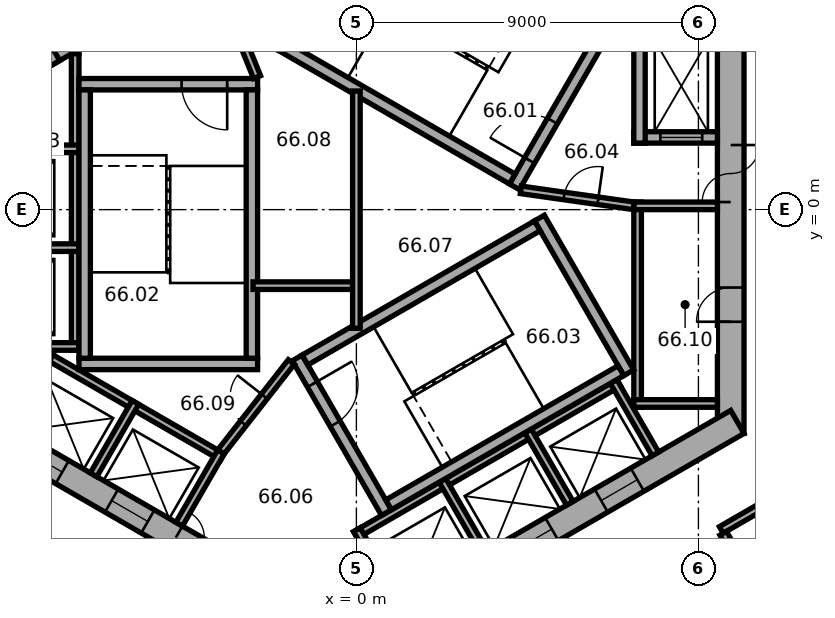
"""IFC4 building model, lengths in metres.
Left out: names, types, materials, properties, quantities, classifications, styles, units other than length and angle.
Written with IfcOpenShell. Run it as: python <this file> out.ifc"""

import sys

from ifc_helpers import new_model, si_unit, direction, frame, frame_2d, origin, place, context, subcontext, project, spatial, rectangle, extrude, element, fill, save


model = new_model("IFC4")
c1 = context("Model", 3, precision=1e-05, world=origin(), true_north=direction((0.0, 1.0)))
c2 = subcontext(c1, "Body", "Model", "MODEL_VIEW")
j1 = project(units=[si_unit("LENGTHUNIT", "METRE"), si_unit("PLANEANGLEUNIT", "RADIAN")], contexts=[c1])
p1 = place(None, origin())
s1 = spatial("IfcSite", under=j1, at=p1, CompositionType="ELEMENT")
p2 = place(p1, origin())
s2 = spatial("IfcBuilding", under=s1, at=p2, CompositionType="ELEMENT")
p3 = place(p2, frame((0.0, 0.0, 267.2)))
s3 = spatial("IfcBuildingStorey", under=s2, at=p3, CompositionType="ELEMENT", Elevation=267.2)
p4 = place(p3, frame((9.85, -5.889, 0.0), z_axis=(0.0, 0.0, 1.0), x_axis=(0.0, 1.0, 0.0)))
e1 = element("IfcWall", 1, at=p4, inside=s3, PredefinedType="SHEAR", context=c2, shape_type="SweptSolid", body=[
    extrude(rectangle(XDim=11.778, YDim=0.7, at=frame_2d((5.889, 0.0))), origin(), (0.0, 0.0, 1.0), 3.7),
])
p5 = place(p4, frame((6.089, 0.0, 0.0)))
e2 = element("IfcOpeningElement", 2, at=p5, cuts=e1, PredefinedType="OPENING", context=c2, shape_type="SweptSolid", body=[
    extrude(rectangle(XDim=1.5, YDim=2.1, at=frame_2d((0.75, 1.05))), frame((0.0, 0.36, 0.0), z_axis=(0.0, -1.0, 0.0), x_axis=(1.0, 0.0, 0.0)), (0.0, 0.0, 1.0), 0.72),
])
p6 = place(p4, frame((2.939, 0.0, 0.0)))
e3 = element("IfcOpeningElement", 3, at=p6, cuts=e1, PredefinedType="OPENING", context=c2, shape_type="SweptSolid", body=[
    extrude(rectangle(XDim=0.9, YDim=2.1, at=frame_2d((0.45, 1.05))), frame((0.0, 0.36, 0.0), z_axis=(0.0, -1.0, 0.0), x_axis=(1.0, 0.0, 0.0)), (0.0, 0.0, 1.0), 0.72),
])
p7 = place(p3, frame((-10.025, -5.586, 0.0), z_axis=(0.0, 0.0, 1.0), x_axis=(0.866026453023, -0.499998182661, 0.0)))
e4 = element("IfcWall", 4, at=p7, inside=s3, PredefinedType="SHEAR", context=c2, shape_type="SweptSolid", body=[
    extrude(rectangle(XDim=11.778, YDim=0.7, at=frame_2d((5.889, 0.0))), origin(), (0.0, 0.0, 1.0), 3.7),
])
p8 = place(p7, frame((6.089, 0.0, 0.0)))
e5 = element("IfcOpeningElement", 5, at=p8, cuts=e4, PredefinedType="OPENING", context=c2, shape_type="SweptSolid", body=[
    extrude(rectangle(XDim=1.5, YDim=2.1, at=frame_2d((0.75, 1.05))), frame((0.0, 0.36, 0.0), z_axis=(0.0, -1.0, 0.0), x_axis=(1.0, 0.0, 0.0)), (0.0, 0.0, 1.0), 0.72),
])
p9 = place(p7, frame((1.539, 0.0, 0.0)))
e6 = element("IfcOpeningElement", 6, at=p9, cuts=e4, PredefinedType="OPENING", context=c2, shape_type="SweptSolid", body=[
    extrude(rectangle(XDim=1.1, YDim=2.1, at=frame_2d((0.55, 1.05))), frame((0.0, 0.36, 0.0), z_axis=(0.0, -1.0, 0.0), x_axis=(1.0, 0.0, 0.0)), (0.0, 0.0, 1.0), 0.72),
])
p10 = place(p7, frame((4.139, 0.0, 0.0)))
e7 = element("IfcOpeningElement", 7, at=p10, cuts=e4, PredefinedType="OPENING", context=c2, shape_type="SweptSolid", body=[
    extrude(rectangle(XDim=1.1, YDim=2.1, at=frame_2d((0.55, 1.05))), frame((0.0, 0.36, 0.0), z_axis=(0.0, -1.0, 0.0), x_axis=(1.0, 0.0, 0.0)), (0.0, 0.0, 1.0), 0.72),
])
p11 = place(p3, frame((-0.175, -11.475, 0.0), z_axis=(0.0, 0.0, 1.0), x_axis=(0.866026453023, 0.499998182661, 0.0)))
e8 = element("IfcWall", 8, at=p11, inside=s3, PredefinedType="SHEAR", context=c2, shape_type="SweptSolid", body=[
    extrude(rectangle(XDim=11.778, YDim=0.7, at=frame_2d((5.889, 0.0))), origin(), (0.0, 0.0, 1.0), 3.7),
])
p12 = place(p11, frame((2.439, 0.0, 0.0)))
e9 = element("IfcOpeningElement", 9, at=p12, cuts=e8, PredefinedType="OPENING", context=c2, shape_type="SweptSolid", body=[
    extrude(rectangle(XDim=1.1, YDim=2.1, at=frame_2d((0.55, 1.05))), frame((0.0, 0.36, 0.0), z_axis=(0.0, -1.0, 0.0), x_axis=(1.0, 0.0, 0.0)), (0.0, 0.0, 1.0), 0.72),
])
p13 = place(p11, frame((5.039, 0.0, 0.0)))
e10 = element("IfcOpeningElement", 10, at=p13, cuts=e8, PredefinedType="OPENING", context=c2, shape_type="SweptSolid", body=[
    extrude(rectangle(XDim=1.1, YDim=2.1, at=frame_2d((0.55, 1.05))), frame((0.0, 0.36, 0.0), z_axis=(0.0, -1.0, 0.0), x_axis=(1.0, 0.0, 0.0)), (0.0, 0.0, 1.0), 0.72),
])
p14 = place(p11, frame((7.639, 0.0, 0.0)))
e11 = element("IfcOpeningElement", 11, at=p14, cuts=e8, PredefinedType="OPENING", context=c2, shape_type="SweptSolid", body=[
    extrude(rectangle(XDim=1.1, YDim=2.1, at=frame_2d((0.55, 1.05))), frame((0.0, 0.36, 0.0), z_axis=(0.0, -1.0, 0.0), x_axis=(1.0, 0.0, 0.0)), (0.0, 0.0, 1.0), 0.72),
])
p15 = place(p3, frame((7.4, -5.2, 0.0), z_axis=(0.0, 0.0, 1.0), x_axis=(0.0, 1.0, 0.0)))
e12 = element("IfcWall", 12, at=p15, inside=s3, PredefinedType="PARTITIONING", context=c2, shape_type="SweptSolid", body=[
    extrude(rectangle(XDim=5.4, YDim=0.2, at=frame_2d((2.7, 0.0))), origin(), (0.0, 0.0, 1.0), 3.42),
])
for number, where, z_axis, x_axis in (
    (13, (7.3, -5.1, 0.0), (0.0, 0.0, 1.0), (1.0, 0.0, 0.0)),
    (14, (7.3, 0.1, 0.0), (0.0, 0.0, 1.0), (1.0, 0.0, 0.0)),
):
    element("IfcWall", number, at=place(p3, frame(where, z_axis=z_axis, x_axis=x_axis)), inside=s3, PredefinedType="PARTITIONING", context=c2, shape_type="SweptSolid", body=[
        extrude(rectangle(XDim=2.2, YDim=0.2, at=frame_2d((1.1, 0.0))), origin(), (0.0, 0.0, 1.0), 3.42),
    ])
p16 = place(p3, frame((-7.4, 4.3, 0.0), z_axis=(0.0, 0.0, 1.0), x_axis=(0.0, -1.0, 0.0)))
e15 = element("IfcWall", 15, at=p16, inside=s3, PredefinedType="PARTITIONING", context=c2, shape_type="SweptSolid", body=[
    extrude(rectangle(XDim=8.0, YDim=0.2, at=frame_2d((4.0, 0.0))), origin(), (0.0, 0.0, 1.0), 3.42),
])
for number, where, z_axis, x_axis in (
    (16, (-7.3, 4.2, 0.0), (0.0, 0.0, 1.0), (-1.0, 0.0, 0.0)),
    (17, (-7.3, 1.6, 0.0), (0.0, 0.0, 1.0), (-1.0, 0.0, 0.0)),
    (18, (-7.3, -1.0, 0.0), (0.0, 0.0, 1.0), (-1.0, 0.0, 0.0)),
    (19, (-7.3, -3.6, 0.0), (0.0, 0.0, 1.0), (-1.0, 0.0, 0.0)),
):
    element("IfcWall", number, at=place(p3, frame(where, z_axis=z_axis, x_axis=x_axis)), inside=s3, PredefinedType="PARTITIONING", context=c2, shape_type="SweptSolid", body=[
        extrude(rectangle(XDim=2.2, YDim=0.2, at=frame_2d((1.1, 0.0))), origin(), (0.0, 0.0, 1.0), 3.42),
    ])
p17 = place(p3, frame((-8.203, -3.809, 0.0), z_axis=(0.0, 0.0, 1.0), x_axis=(0.866028230842, -0.499995103361, 0.0)))
e20 = element("IfcWall", 20, at=p17, inside=s3, PredefinedType="PARTITIONING", context=c2, shape_type="SweptSolid", body=[
    extrude(rectangle(XDim=5.4, YDim=0.2, at=frame_2d((2.7, 0.0))), origin(), (0.0, 0.0, 1.0), 3.42),
])
for number, where, z_axis, x_axis in (
    (21, (-8.067, -3.772, 0.0), (0.0, 0.0, 1.0), (-0.5, -0.866, 0.0)),
    (22, (-5.815, -5.072, 0.0), (0.0, 0.0, 1.0), (-0.5, -0.866, 0.0)),
):
    element("IfcWall", number, at=place(p3, frame(where, z_axis=z_axis, x_axis=x_axis)), inside=s3, PredefinedType="PARTITIONING", context=c2, shape_type="SweptSolid", body=[
        extrude(rectangle(XDim=2.2, YDim=0.2, at=frame_2d((1.1, 0.0))), origin(), (0.0, 0.0, 1.0), 3.42),
    ])
p18 = place(p3, frame((-3.563, -6.372, 0.0), z_axis=(0.0, 0.0, 1.0), x_axis=(-0.499994660107, -0.866028486751, 0.0)))
e23 = element("IfcWall", 23, at=p18, inside=s3, PredefinedType="PARTITIONING", context=c2, shape_type="SweptSolid", body=[
    extrude(rectangle(XDim=2.2, YDim=0.2, at=frame_2d((1.1, 0.0))), origin(), (0.0, 0.0, 1.0), 3.42),
])
p19 = place(p3, frame((-0.024, -8.559, 0.0), z_axis=(0.0, 0.0, 1.0), x_axis=(0.866026010844, 0.49999894854, 0.0)))
e24 = element("IfcWall", 24, at=p19, inside=s3, PredefinedType="PARTITIONING", context=c2, shape_type="SweptSolid", body=[
    extrude(rectangle(XDim=8.0, YDim=0.2, at=frame_2d((4.0, 0.0))), origin(), (0.0, 0.0, 1.0), 3.42),
])
for number, where, z_axis, x_axis in (
    (25, (0.013, -8.422, 0.0), (0.0, 0.0, 1.0), (0.5, -0.866, 0.0)),
    (26, (2.264, -7.122, 0.0), (0.0, 0.0, 1.0), (0.5, -0.866, 0.0)),
    (27, (4.516, -5.822, 0.0), (0.0, 0.0, 1.0), (0.5, -0.866, 0.0)),
    (28, (6.768, -4.522, 0.0), (0.0, 0.0, 1.0), (0.5, -0.866, 0.0)),
):
    element("IfcWall", number, at=place(p3, frame(where, z_axis=z_axis, x_axis=x_axis)), inside=s3, PredefinedType="PARTITIONING", context=c2, shape_type="SweptSolid", body=[
        extrude(rectangle(XDim=2.2, YDim=0.2, at=frame_2d((1.1, 0.0))), origin(), (0.0, 0.0, 1.0), 3.42),
    ])
p20 = place(p3, frame((4.158, 0.602, 0.0), z_axis=(0.0, 0.0, 1.0), x_axis=(0.499977259774, 0.866038532462, 0.0)))
e29 = element("IfcWall", 29, at=p20, inside=s3, PredefinedType="SHEAR", context=c2, shape_type="SweptSolid", body=[
    extrude(rectangle(XDim=4.7, YDim=0.3, at=frame_2d((2.35, 0.0))), origin(), (0.0, 0.0, 1.0), 3.42),
])
p21 = place(p20, frame((0.8, 0.0, 0.0)))
e30 = element("IfcOpeningElement", 30, at=p21, cuts=e29, PredefinedType="OPENING", context=c2, shape_type="SweptSolid", body=[
    extrude(rectangle(XDim=1.2, YDim=2.1, at=frame_2d((0.6, 1.05))), frame((0.0, 0.16, 0.0), z_axis=(0.0, -1.0, 0.0), x_axis=(1.0, 0.0, 0.0)), (0.0, 0.0, 1.0), 0.32),
])
p22 = place(p3, frame((4.103, 0.807, 0.0), z_axis=(0.0, 0.0, 1.0), x_axis=(-0.866027801685, 0.499995846692, 0.0)))
e31 = element("IfcWall", 31, at=p22, inside=s3, PredefinedType="SHEAR", context=c2, shape_type="SweptSolid", body=[
    extrude(rectangle(XDim=7.06, YDim=0.3, at=frame_2d((3.53, 0.0))), origin(), (0.0, 0.0, 1.0), 3.42),
])
p23 = place(p3, frame((-2.6, 3.3, 0.0), z_axis=(0.0, 0.0, 1.0), x_axis=(-1.0, 0.0, 0.0)))
e32 = element("IfcWall", 32, at=p23, inside=s3, PredefinedType="SHEAR", context=c2, shape_type="SweptSolid", body=[
    extrude(rectangle(XDim=4.7, YDim=0.3, at=frame_2d((2.35, 0.0))), origin(), (0.0, 0.0, 1.0), 3.42),
])
p24 = place(p23, frame((0.8, 0.0, 0.0)))
e33 = element("IfcOpeningElement", 33, at=p24, cuts=e32, PredefinedType="OPENING", context=c2, shape_type="SweptSolid", body=[
    extrude(rectangle(XDim=1.2, YDim=2.1, at=frame_2d((0.6, 1.05))), frame((0.0, 0.16, 0.0), z_axis=(0.0, -1.0, 0.0), x_axis=(1.0, 0.0, 0.0)), (0.0, 0.0, 1.0), 0.32),
])
p25 = place(p3, frame((-2.6, -4.06, 0.0), z_axis=(0.0, 0.0, 1.0), x_axis=(-1.0, 0.0, 0.0)))
e34 = element("IfcWall", 34, at=p25, inside=s3, PredefinedType="SHEAR", context=c2, shape_type="SweptSolid", body=[
    extrude(rectangle(XDim=4.7, YDim=0.3, at=frame_2d((2.35, 0.0))), origin(), (0.0, 0.0, 1.0), 3.42),
])
for number, where, z_axis, x_axis in (
    (35, (-2.75, 3.15, 0.0), (0.0, 0.0, 1.0), (0.0, -1.0, 0.0)),
    (36, (-7.15, 3.15, 0.0), (0.0, 0.0, 1.0), (0.0, -1.0, 0.0)),
):
    element("IfcWall", number, at=place(p3, frame(where, z_axis=z_axis, x_axis=x_axis)), inside=s3, PredefinedType="SHEAR", context=c2, shape_type="SweptSolid", body=[
        extrude(rectangle(XDim=7.06, YDim=0.3, at=frame_2d((3.53, 0.0))), origin(), (0.0, 0.0, 1.0), 3.42),
    ])
p26 = place(p3, frame((-1.558, -3.902, 0.0), z_axis=(0.0, 0.0, 1.0), x_axis=(0.499977259774, -0.866038532462, 0.0)))
e37 = element("IfcWall", 37, at=p26, inside=s3, PredefinedType="SHEAR", context=c2, shape_type="SweptSolid", body=[
    extrude(rectangle(XDim=4.7, YDim=0.3, at=frame_2d((2.35, 0.0))), origin(), (0.0, 0.0, 1.0), 3.42),
])
p27 = place(p26, frame((0.8, 0.0, 0.0)))
e38 = element("IfcOpeningElement", 38, at=p27, cuts=e37, PredefinedType="OPENING", context=c2, shape_type="SweptSolid", body=[
    extrude(rectangle(XDim=1.2, YDim=2.1, at=frame_2d((0.6, 1.05))), frame((0.0, 0.16, 0.0), z_axis=(0.0, -1.0, 0.0), x_axis=(1.0, 0.0, 0.0)), (0.0, 0.0, 1.0), 0.32),
])
p28 = place(p3, frame((4.816, -0.222, 0.0), z_axis=(0.0, 0.0, 1.0), x_axis=(0.499977259774, -0.866038532462, 0.0)))
e39 = element("IfcWall", 39, at=p28, inside=s3, PredefinedType="SHEAR", context=c2, shape_type="SweptSolid", body=[
    extrude(rectangle(XDim=4.7, YDim=0.3, at=frame_2d((2.35, 0.0))), origin(), (0.0, 0.0, 1.0), 3.42),
])
for number, where, z_axis, x_axis in (
    (40, (-1.353, -3.957, 0.0), (0.0, 0.0, 1.0), (0.866, 0.5, 0.0)),
    (41, (0.847, -7.767, 0.0), (0.0, 0.0, 1.0), (0.866, 0.5, 0.0)),
):
    element("IfcWall", number, at=place(p3, frame(where, z_axis=z_axis, x_axis=x_axis)), inside=s3, PredefinedType="SHEAR", context=c2, shape_type="SweptSolid", body=[
        extrude(rectangle(XDim=7.06, YDim=0.3, at=frame_2d((3.53, 0.0))), origin(), (0.0, 0.0, 1.0), 3.42),
    ])
p29 = place(p3, frame((7.3, 1.9, 0.0), z_axis=(0.0, 0.0, 1.0), x_axis=(1.0, 0.0, 0.0)))
e42 = element("IfcWall", 42, at=p29, inside=s3, PredefinedType="SHEAR", context=c2, shape_type="SweptSolid", body=[
    extrude(rectangle(XDim=2.2, YDim=0.3, at=frame_2d((1.1, 0.0))), origin(), (0.0, 0.0, 1.0), 3.42),
])
p30 = place(p29, frame((0.7, 0.0, 0.0)))
e43 = element("IfcOpeningElement", 43, at=p30, cuts=e42, PredefinedType="OPENING", context=c2, shape_type="SweptSolid", body=[
    extrude(rectangle(XDim=1.1, YDim=2.1, at=frame_2d((0.55, 1.05))), frame((0.0, 0.16, 0.0), z_axis=(0.0, -1.0, 0.0), x_axis=(1.0, 0.0, 0.0)), (0.0, 0.0, 1.0), 0.32),
])
p31 = place(p3, frame((7.45, 1.75, 0.0), z_axis=(0.0, 0.0, 1.0), x_axis=(0.0, 1.0, 0.0)))
e44 = element("IfcWall", 44, at=p31, inside=s3, PredefinedType="SHEAR", context=c2, shape_type="SweptSolid", body=[
    extrude(rectangle(XDim=3.35, YDim=0.3, at=frame_2d((1.675, 0.0))), origin(), (0.0, 0.0, 1.0), 3.42),
])
p32 = place(p3, frame((4.327, 0.521, 0.0), z_axis=(0.0, 0.0, 1.0), x_axis=(0.990124376366, -0.14019172346, 0.0)))
e45 = element("IfcWall", 45, at=p32, inside=s3, PredefinedType="PARTITIONING", context=c2, shape_type="SweptSolid", body=[
    extrude(rectangle(XDim=3.002, YDim=0.2, at=frame_2d((1.501, 0.0))), origin(), (0.0, 0.0, 1.0), 3.42),
])
p33 = place(p32, frame((1.15, 0.0, 0.0)))
e46 = element("IfcOpeningElement", 46, at=p33, cuts=e45, PredefinedType="OPENING", context=c2, shape_type="SweptSolid", body=[
    extrude(rectangle(XDim=0.9, YDim=2.1, at=frame_2d((0.45, 1.05))), frame((0.0, 0.11, 0.0), z_axis=(0.0, -1.0, 0.0), x_axis=(1.0, 0.0, 0.0)), (0.0, 0.0, 1.0), 0.22),
])
p34 = place(p3, frame((-5.24, 5.577, 0.0), z_axis=(0.0, 0.0, 1.0), x_axis=(-0.866014461049, -0.500018952895, 0.0)))
e47 = element("IfcWall", 47, at=p34, inside=s3, PredefinedType="SHEAR", context=c2, shape_type="SweptSolid", body=[
    extrude(rectangle(XDim=3.35, YDim=0.3, at=frame_2d((1.675, 0.0))), origin(), (0.0, 0.0, 1.0), 3.42),
])
p35 = place(p3, frame((-7.937, 3.847, 0.0), z_axis=(0.0, 0.0, 1.0), x_axis=(-0.50002983664, 0.866008176907, 0.0)))
e48 = element("IfcWall", 48, at=p35, inside=s3, PredefinedType="SHEAR", context=c2, shape_type="SweptSolid", body=[
    extrude(rectangle(XDim=2.2, YDim=0.3, at=frame_2d((1.1, 0.0))), origin(), (0.0, 0.0, 1.0), 3.42),
])
p36 = place(p3, frame((-2.615, 3.487, 0.0), z_axis=(0.0, 0.0, 1.0), x_axis=(-0.373576831041, 0.92759924068, 0.0)))
e49 = element("IfcWall", 49, at=p36, inside=s3, PredefinedType="PARTITIONING", context=c2, shape_type="SweptSolid", body=[
    extrude(rectangle(XDim=3.002, YDim=0.2, at=frame_2d((1.501, 0.0))), origin(), (0.0, 0.0, 1.0), 3.42),
])
p37 = place(p36, frame((1.15, 0.0, 0.0)))
e50 = element("IfcOpeningElement", 50, at=p37, cuts=e49, PredefinedType="OPENING", context=c2, shape_type="SweptSolid", body=[
    extrude(rectangle(XDim=0.9, YDim=2.1, at=frame_2d((0.45, 1.05))), frame((0.0, 0.11, 0.0), z_axis=(0.0, -1.0, 0.0), x_axis=(1.0, 0.0, 0.0)), (0.0, 0.0, 1.0), 0.22),
])
p38 = place(p3, frame((-1.712, -4.008, 0.0), z_axis=(0.0, 0.0, 1.0), x_axis=(-0.616549420702, -0.787316208287, 0.0)))
e51 = element("IfcWall", 51, at=p38, inside=s3, PredefinedType="PARTITIONING", context=c2, shape_type="SweptSolid", body=[
    extrude(rectangle(XDim=3.002, YDim=0.2, at=frame_2d((1.501, 0.0))), origin(), (0.0, 0.0, 1.0), 3.42),
])
p39 = place(p38, frame((1.15, 0.0, 0.0)))
e52 = element("IfcOpeningElement", 52, at=p39, cuts=e51, PredefinedType="OPENING", context=c2, shape_type="SweptSolid", body=[
    extrude(rectangle(XDim=0.9, YDim=2.1, at=frame_2d((0.45, 1.05))), frame((0.0, 0.11, 0.0), z_axis=(0.0, -1.0, 0.0), x_axis=(1.0, 0.0, 0.0)), (0.0, 0.0, 1.0), 0.22),
])
p40 = place(p3, frame((-2.72, -2.0, 0.0), z_axis=(0.0, 0.0, 1.0), x_axis=(1.0, 0.0, 0.0)))
e53 = element("IfcWall", 53, at=p40, inside=s3, PredefinedType="PARTITIONING", context=c2, shape_type="SweptSolid", body=[
    extrude(rectangle(XDim=2.62, YDim=0.2, at=frame_2d((1.31, 0.0))), origin(), (0.0, 0.0, 1.0), 3.42),
])
p41 = place(p3, frame((0.0, -3.122, 0.0), z_axis=(0.0, 0.0, 1.0), x_axis=(0.0, 1.0, 0.0)))
e54 = element("IfcWall", 54, at=p41, inside=s3, PredefinedType="PARTITIONING", context=c2, shape_type="SweptSolid", body=[
    extrude(rectangle(XDim=6.245, YDim=0.2, at=frame_2d((3.122, 0.0))), origin(), (0.0, 0.0, 1.0), 3.42),
])
p42 = place(p3, frame((-11.501, -8.719, 0.0), z_axis=(0.0, 0.0, 1.0), x_axis=(0.866024434742, -0.500001678427, 0.0)))
e55 = element("IfcWall", 55, at=p42, inside=s3, PredefinedType="PARTITIONING", context=c2, shape_type="SweptSolid", body=[
    extrude(rectangle(XDim=4.718, YDim=0.2, at=frame_2d((2.359, 0.0))), origin(), (0.0, 0.0, 1.0), 3.42),
])
p43 = place(p3, frame((9.602, -8.428, 0.0), z_axis=(0.0, 0.0, 1.0), x_axis=(0.865999114786, 0.500045531117, 0.0)))
e56 = element("IfcWall", 56, at=p43, inside=s3, PredefinedType="PARTITIONING", context=c2, shape_type="SweptSolid", body=[
    extrude(rectangle(XDim=1.788, YDim=0.2, at=frame_2d((0.894, 0.0))), origin(), (0.0, 0.0, 1.0), 3.42),
])
p44 = place(p3, frame((10.152, -9.382, 0.0), z_axis=(0.0, 0.0, 1.0), x_axis=(-0.499968756647, 0.866043441391, 0.0)))
e57 = element("IfcWall", 57, at=p44, inside=s3, PredefinedType="PARTITIONING", context=c2, shape_type="SweptSolid", body=[
    extrude(rectangle(XDim=1.001, YDim=0.2, at=frame_2d((0.5, 0.0))), origin(), (0.0, 0.0, 1.0), 3.42),
])
p45 = place(p5, origin())
e58 = element("IfcDoor", 58, at=p45, inside=s3, OperationType="DOUBLE_DOOR_SINGLE_SWING", PredefinedType="DOOR", context=c2, shape_type="SweptSolid", body=[
    extrude(rectangle(XDim=1.5, YDim=2.1, at=frame_2d((0.75, 1.05))), frame((0.0, 0.025, 0.0), z_axis=(0.0, -1.0, 0.0), x_axis=(1.0, 0.0, 0.0)), (0.0, 0.0, 1.0), 0.05),
])
fill(e2, e58)
p46 = place(p8, origin())
e59 = element("IfcDoor", 59, at=p46, inside=s3, OperationType="DOUBLE_DOOR_SINGLE_SWING", PredefinedType="DOOR", context=c2, shape_type="SweptSolid", body=[
    extrude(rectangle(XDim=1.5, YDim=2.1, at=frame_2d((0.75, 1.05))), frame((0.0, 0.025, 0.0), z_axis=(0.0, -1.0, 0.0), x_axis=(1.0, 0.0, 0.0)), (0.0, 0.0, 1.0), 0.05),
])
fill(e5, e59)
p47 = place(p21, origin())
e60 = element("IfcDoor", 60, at=p47, inside=s3, OperationType="SINGLE_SWING_RIGHT", PredefinedType="DOOR", context=c2, shape_type="SweptSolid", body=[
    extrude(rectangle(XDim=1.2, YDim=2.1, at=frame_2d((0.6, 1.05))), frame((0.0, 0.025, 0.0), z_axis=(0.0, -1.0, 0.0), x_axis=(1.0, 0.0, 0.0)), (0.0, 0.0, 1.0), 0.05),
])
fill(e30, e60)
p48 = place(p24, origin())
e61 = element("IfcDoor", 61, at=p48, inside=s3, OperationType="SINGLE_SWING_RIGHT", PredefinedType="DOOR", context=c2, shape_type="SweptSolid", body=[
    extrude(rectangle(XDim=1.2, YDim=2.1, at=frame_2d((0.6, 1.05))), frame((0.0, 0.025, 0.0), z_axis=(0.0, -1.0, 0.0), x_axis=(1.0, 0.0, 0.0)), (0.0, 0.0, 1.0), 0.05),
])
fill(e33, e61)
p49 = place(p27, origin())
e62 = element("IfcDoor", 62, at=p49, inside=s3, OperationType="SINGLE_SWING_RIGHT", PredefinedType="DOOR", context=c2, shape_type="SweptSolid", body=[
    extrude(rectangle(XDim=1.2, YDim=2.1, at=frame_2d((0.6, 1.05))), frame((0.0, 0.025, 0.0), z_axis=(0.0, -1.0, 0.0), x_axis=(1.0, 0.0, 0.0)), (0.0, 0.0, 1.0), 0.05),
])
fill(e38, e62)
p50 = place(p33, origin())
e63 = element("IfcDoor", 63, at=p50, inside=s3, OperationType="SINGLE_SWING_LEFT", PredefinedType="DOOR", context=c2, shape_type="SweptSolid", body=[
    extrude(rectangle(XDim=0.9, YDim=2.1, at=frame_2d((0.45, 1.05))), frame((0.0, 0.025, 0.0), z_axis=(0.0, -1.0, 0.0), x_axis=(1.0, 0.0, 0.0)), (0.0, 0.0, 1.0), 0.05),
])
fill(e46, e63)
p51 = place(p39, origin())
e64 = element("IfcDoor", 64, at=p51, inside=s3, OperationType="SINGLE_SWING_LEFT", PredefinedType="DOOR", context=c2, shape_type="SweptSolid", body=[
    extrude(rectangle(XDim=0.9, YDim=2.1, at=frame_2d((0.45, 1.05))), frame((0.0, 0.025, 0.0), z_axis=(0.0, -1.0, 0.0), x_axis=(1.0, 0.0, 0.0)), (0.0, 0.0, 1.0), 0.05),
])
fill(e52, e64)
p52 = place(p6, origin())
e65 = element("IfcDoor", 65, at=p52, inside=s3, OperationType="SINGLE_SWING_LEFT", PredefinedType="DOOR", context=c2, shape_type="SweptSolid", body=[
    extrude(rectangle(XDim=0.9, YDim=2.1, at=frame_2d((0.45, 1.05))), frame((0.0, 0.025, 0.0), z_axis=(0.0, -1.0, 0.0), x_axis=(1.0, 0.0, 0.0)), (0.0, 0.0, 1.0), 0.05),
])
fill(e3, e65)
p53 = place(p30, origin())
e66 = element("IfcDoor", 66, at=p53, inside=s3, OperationType="DOUBLE_DOOR_SLIDING", PredefinedType="DOOR", context=c2, shape_type="SweptSolid", body=[
    extrude(rectangle(XDim=1.1, YDim=2.1, at=frame_2d((0.55, 1.05))), frame((0.0, 0.025, 0.0), z_axis=(0.0, -1.0, 0.0), x_axis=(1.0, 0.0, 0.0)), (0.0, 0.0, 1.0), 0.05),
])
fill(e43, e66)
p54 = place(p9, origin())
e67 = element("IfcDoor", 67, at=p54, inside=s3, OperationType="DOUBLE_DOOR_SLIDING", PredefinedType="DOOR", context=c2, shape_type="SweptSolid", body=[
    extrude(rectangle(XDim=1.1, YDim=2.1, at=frame_2d((0.55, 1.05))), frame((0.0, 0.025, 0.0), z_axis=(0.0, -1.0, 0.0), x_axis=(1.0, 0.0, 0.0)), (0.0, 0.0, 1.0), 0.05),
])
fill(e6, e67)
p55 = place(p10, origin())
e68 = element("IfcDoor", 68, at=p55, inside=s3, OperationType="DOUBLE_DOOR_SLIDING", PredefinedType="DOOR", context=c2, shape_type="SweptSolid", body=[
    extrude(rectangle(XDim=1.1, YDim=2.1, at=frame_2d((0.55, 1.05))), frame((0.0, 0.025, 0.0), z_axis=(0.0, -1.0, 0.0), x_axis=(1.0, 0.0, 0.0)), (0.0, 0.0, 1.0), 0.05),
])
fill(e7, e68)
p56 = place(p13, origin())
e69 = element("IfcDoor", 69, at=p56, inside=s3, OperationType="DOUBLE_DOOR_SLIDING", PredefinedType="DOOR", context=c2, shape_type="SweptSolid", body=[
    extrude(rectangle(XDim=1.1, YDim=2.1, at=frame_2d((0.55, 1.05))), frame((0.0, 0.025, 0.0), z_axis=(0.0, -1.0, 0.0), x_axis=(1.0, 0.0, 0.0)), (0.0, 0.0, 1.0), 0.05),
])
fill(e10, e69)
p57 = place(p14, origin())
e70 = element("IfcDoor", 70, at=p57, inside=s3, OperationType="DOUBLE_DOOR_SLIDING", PredefinedType="DOOR", context=c2, shape_type="SweptSolid", body=[
    extrude(rectangle(XDim=1.1, YDim=2.1, at=frame_2d((0.55, 1.05))), frame((0.0, 0.025, 0.0), z_axis=(0.0, -1.0, 0.0), x_axis=(1.0, 0.0, 0.0)), (0.0, 0.0, 1.0), 0.05),
])
fill(e11, e70)
save(model, sys.argv[1])
